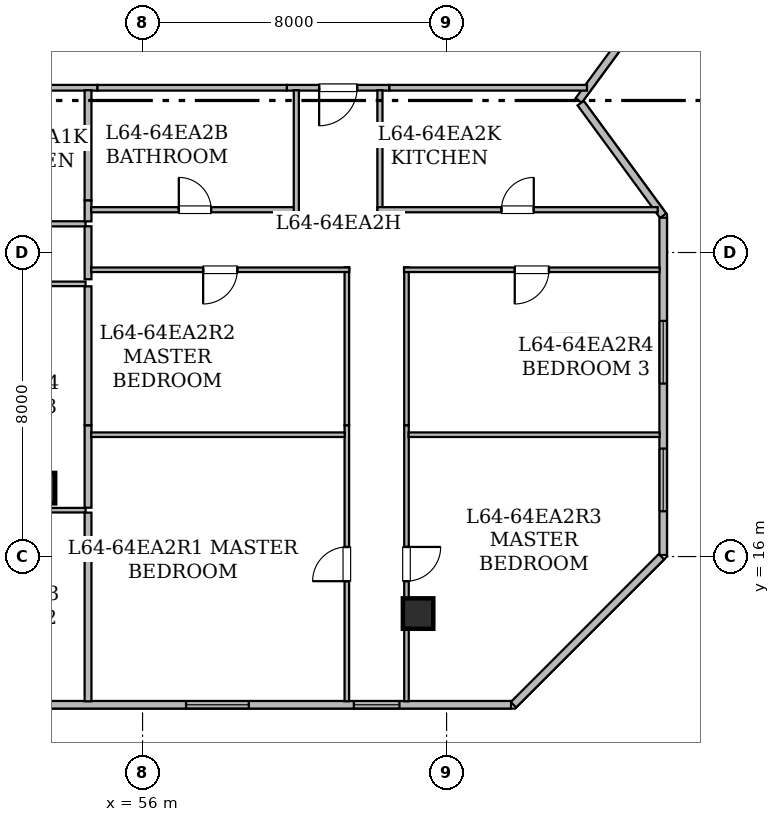
"""IFC4 building model, lengths in metres.
Left out: names, types, materials, properties, quantities, classifications, styles, units other than length and angle.
Written with IfcOpenShell. Run it as: python <this file> out.ifc"""

import sys

from ifc_helpers import new_model, si_unit, direction, frame, frame_2d, origin, origin_2d, place, context, subcontext, project, spatial, rectangle, hollow_rectangle, extrude, element, fill, save


model = new_model("IFC4")
c1 = context("Model", 3, precision=1e-05, world=origin(), true_north=direction((0.0, 1.0)))
c2 = subcontext(c1, "Body", "Model", "MODEL_VIEW")
j1 = project(units=[si_unit("LENGTHUNIT", "METRE"), si_unit("PLANEANGLEUNIT", "RADIAN")], contexts=[c1])
p1 = place(None, origin())
s1 = spatial("IfcSite", under=j1, at=p1, CompositionType="ELEMENT")
p2 = place(p1, origin())
s2 = spatial("IfcBuilding", under=s1, at=p2, CompositionType="ELEMENT")
p3 = place(p2, frame((0.0, 0.0, 250.05)))
s3 = spatial("IfcBuildingStorey", under=s2, at=p3, CompositionType="ELEMENT", Elevation=250.05)
for number, where, z_axis, x_axis in (
    (1, (63.25, 14.5, 0.0), (0.0, 0.0, 1.0), (1.0, 0.0, 0.0)),
    (2, (67.2, 21.425, 0.0), (0.0, 0.0, 1.0), (1.0, 0.0, 0.0)),
    (3, (53.3, 17.8, 0.0), (0.0, 0.0, 1.0), (1.0, 0.0, 0.0)),
):
    element("IfcColumn", number, at=place(p3, frame(where, z_axis=z_axis, x_axis=x_axis)), inside=s3, PredefinedType="COLUMN", context=c2, shape_type="SweptSolid", body=[
        extrude(hollow_rectangle(XDim=0.8, YDim=0.8, WallThickness=0.04, at=origin_2d()), origin(), (0.0, 0.0, 1.0), 3.65),
    ])
p4 = place(p3, frame((69.67, 30.992, 0.0), z_axis=(0.0, 0.0, 1.0), x_axis=(-0.591320870733, -0.806436375566, 0.0)))
e4 = element("IfcWall", 4, at=p4, inside=s3, PredefinedType="STANDARD", context=c2, shape_type="SweptSolid", body=[
    extrude(rectangle(XDim=3.71, YDim=0.2, at=frame_2d((1.855, 0.0))), origin(), (0.0, 0.0, 1.0), 3.43),
])
p5 = place(p3, frame((67.527, 27.931, 0.0), z_axis=(0.0, 0.0, 1.0), x_axis=(0.591248456881, -0.80648946815, 0.0)))
e5 = element("IfcWall", 5, at=p5, inside=s3, PredefinedType="STANDARD", context=c2, shape_type="SweptSolid", body=[
    extrude(rectangle(XDim=3.675, YDim=0.2, at=frame_2d((1.837, 0.0))), origin(), (0.0, 0.0, 1.0), 3.43),
])
p6 = place(p3, frame((69.7, 24.916, 0.0), z_axis=(0.0, 0.0, 1.0), x_axis=(0.0, -1.0, 0.0)))
e6 = element("IfcWall", 6, at=p6, inside=s3, PredefinedType="STANDARD", context=c2, shape_type="SweptSolid", body=[
    extrude(rectangle(XDim=8.875, YDim=0.2, at=frame_2d((4.438, 0.0))), origin(), (0.0, 0.0, 1.0), 3.43),
])
p7 = place(p6, frame((6.075, 0.0, 0.85)))
e7 = element("IfcOpeningElement", 7, at=p7, cuts=e6, PredefinedType="OPENING", context=c2, shape_type="SweptSolid", body=[
    extrude(rectangle(XDim=1.65, YDim=1.55, at=frame_2d((0.825, 0.775))), frame((0.0, 0.11, 0.0), z_axis=(0.0, -1.0, 0.0), x_axis=(1.0, 0.0, 0.0)), (0.0, 0.0, 1.0), 0.22),
])
p8 = place(p6, frame((2.715, 0.0, 0.85)))
e8 = element("IfcOpeningElement", 8, at=p8, cuts=e6, PredefinedType="OPENING", context=c2, shape_type="SweptSolid", body=[
    extrude(rectangle(XDim=1.65, YDim=1.55, at=frame_2d((0.825, 0.775))), frame((0.0, 0.11, 0.0), z_axis=(0.0, -1.0, 0.0), x_axis=(1.0, 0.0, 0.0)), (0.0, 0.0, 1.0), 0.22),
])
p9 = place(p3, frame((69.655, 15.996, 0.0), z_axis=(0.0, 0.0, 1.0), x_axis=(-0.707106781187, -0.707106781187, 0.0)))
e9 = element("IfcWall", 9, at=p9, inside=s3, PredefinedType="STANDARD", context=c2, shape_type="SweptSolid", body=[
    extrude(rectangle(XDim=5.51, YDim=0.2, at=frame_2d((2.755, 0.0))), origin(), (0.0, 0.0, 1.0), 3.43),
])
p10 = place(p3, frame((65.696, 12.1, 0.0), z_axis=(0.0, 0.0, 1.0), x_axis=(-1.0, 0.0, 0.0)))
e10 = element("IfcWall", 10, at=p10, inside=s3, PredefinedType="STANDARD", context=c2, shape_type="SweptSolid", body=[
    extrude(rectangle(XDim=41.393, YDim=0.2, at=frame_2d((20.697, 0.0))), origin(), (0.0, 0.0, 1.0), 3.43),
])
p11 = place(p10, frame((33.821, 0.0, 0.85)))
e11 = element("IfcOpeningElement", 11, at=p11, cuts=e10, PredefinedType="OPENING", context=c2, shape_type="SweptSolid", body=[
    extrude(rectangle(XDim=1.65, YDim=1.55, at=frame_2d((0.825, 0.775))), frame((0.0, 0.11, 0.0), z_axis=(0.0, -1.0, 0.0), x_axis=(1.0, 0.0, 0.0)), (0.0, 0.0, 1.0), 0.22),
])
p12 = place(p10, frame((39.16, 0.0, 0.85)))
e12 = element("IfcOpeningElement", 12, at=p12, cuts=e10, PredefinedType="OPENING", context=c2, shape_type="SweptSolid", body=[
    extrude(rectangle(XDim=1.65, YDim=1.55, at=frame_2d((0.825, 0.775))), frame((0.0, 0.11, 0.0), z_axis=(0.0, -1.0, 0.0), x_axis=(1.0, 0.0, 0.0)), (0.0, 0.0, 1.0), 0.22),
])
p13 = place(p10, frame((17.006, 0.0, 0.8)))
e13 = element("IfcOpeningElement", 13, at=p13, cuts=e10, PredefinedType="OPENING", context=c2, shape_type="SweptSolid", body=[
    extrude(rectangle(XDim=1.2, YDim=1.5, at=frame_2d((0.6, 0.75))), frame((0.0, 0.11, 0.0), z_axis=(0.0, -1.0, 0.0), x_axis=(1.0, 0.0, 0.0)), (0.0, 0.0, 1.0), 0.22),
])
p14 = place(p10, frame((20.411, 0.0, 0.85)))
e14 = element("IfcOpeningElement", 14, at=p14, cuts=e10, PredefinedType="OPENING", context=c2, shape_type="SweptSolid", body=[
    extrude(rectangle(XDim=1.65, YDim=1.55, at=frame_2d((0.825, 0.775))), frame((0.0, 0.11, 0.0), z_axis=(0.0, -1.0, 0.0), x_axis=(1.0, 0.0, 0.0)), (0.0, 0.0, 1.0), 0.22),
])
p15 = place(p10, frame((13.151, 0.0, 0.85)))
e15 = element("IfcOpeningElement", 15, at=p15, cuts=e10, PredefinedType="OPENING", context=c2, shape_type="SweptSolid", body=[
    extrude(rectangle(XDim=1.65, YDim=1.55, at=frame_2d((0.825, 0.775))), frame((0.0, 0.11, 0.0), z_axis=(0.0, -1.0, 0.0), x_axis=(1.0, 0.0, 0.0)), (0.0, 0.0, 1.0), 0.22),
])
p16 = place(p10, frame((2.936, 0.0, 0.8)))
e16 = element("IfcOpeningElement", 16, at=p16, cuts=e10, PredefinedType="OPENING", context=c2, shape_type="SweptSolid", body=[
    extrude(rectangle(XDim=1.2, YDim=1.5, at=frame_2d((0.6, 0.75))), frame((0.0, 0.11, 0.0), z_axis=(0.0, -1.0, 0.0), x_axis=(1.0, 0.0, 0.0)), (0.0, 0.0, 1.0), 0.22),
])
p17 = place(p10, frame((6.901, 0.0, 0.85)))
e17 = element("IfcOpeningElement", 17, at=p17, cuts=e10, PredefinedType="OPENING", context=c2, shape_type="SweptSolid", body=[
    extrude(rectangle(XDim=1.65, YDim=1.55, at=frame_2d((0.825, 0.775))), frame((0.0, 0.11, 0.0), z_axis=(0.0, -1.0, 0.0), x_axis=(1.0, 0.0, 0.0)), (0.0, 0.0, 1.0), 0.22),
])
p18 = place(p3, frame((54.814, 28.335, 0.0), z_axis=(0.0, 0.0, 1.0), x_axis=(-1.0, 0.0, 0.0)))
e18 = element("IfcWall", 18, at=p18, inside=s3, PredefinedType="STANDARD", context=c2, shape_type="SweptSolid", body=[
    extrude(rectangle(XDim=5.375, YDim=0.15, at=frame_2d((2.688, 0.0))), origin(), (0.0, 0.0, 1.0), 2.725),
])
p19 = place(p3, frame((62.495, 28.335, 0.0), z_axis=(0.0, 0.0, 1.0), x_axis=(-1.0, 0.0, 0.0)))
e19 = element("IfcWall", 19, at=p19, inside=s3, PredefinedType="STANDARD", context=c2, shape_type="SweptSolid", body=[
    extrude(rectangle(XDim=2.699, YDim=0.15, at=frame_2d((1.35, 0.0))), origin(), (0.0, 0.0, 1.0), 3.43),
])
p20 = place(p19, frame((0.849, 0.0, 0.0)))
e20 = element("IfcOpeningElement", 20, at=p20, cuts=e19, PredefinedType="OPENING", context=c2, shape_type="SweptSolid", body=[
    extrude(rectangle(XDim=1.0, YDim=2.15, at=frame_2d((0.5, 1.075))), frame((0.0, 0.085, 0.0), z_axis=(0.0, -1.0, 0.0), x_axis=(1.0, 0.0, 0.0)), (0.0, 0.0, 1.0), 0.17),
])
p21 = place(p3, frame((59.796, 28.335, 0.0), z_axis=(0.0, 0.0, 1.0), x_axis=(-1.0, 0.0, 0.0)))
e21 = element("IfcWall", 21, at=p21, inside=s3, PredefinedType="STANDARD", context=c2, shape_type="SweptSolid", body=[
    extrude(rectangle(XDim=4.982, YDim=0.15, at=frame_2d((2.491, 0.0))), origin(), (0.0, 0.0, 1.0), 3.43),
])
p22 = place(p3, frame((67.694, 28.335, 0.0), z_axis=(0.0, 0.0, 1.0), x_axis=(-1.0, 0.0, 0.0)))
e22 = element("IfcWall", 22, at=p22, inside=s3, PredefinedType="STANDARD", context=c2, shape_type="SweptSolid", body=[
    extrude(rectangle(XDim=5.199, YDim=0.15, at=frame_2d((2.6, 0.0))), origin(), (0.0, 0.0, 1.0), 2.887),
])
p23 = place(p3, frame((49.125, 24.755, 0.0), z_axis=(0.0, 0.0, 1.0), x_axis=(1.0, 0.0, 0.0)))
e23 = element("IfcWall", 23, at=p23, inside=s3, PredefinedType="PARTITIONING", context=c2, shape_type="SweptSolid", body=[
    extrude(rectangle(XDim=5.375, YDim=0.135, at=frame_2d((2.688, 0.0))), origin(), (0.0, 0.0, 1.0), 2.725),
])
p24 = place(p23, frame((2.263, 0.0, 0.0)))
e24 = element("IfcOpeningElement", 24, at=p24, cuts=e23, PredefinedType="OPENING", context=c2, shape_type="SweptSolid", body=[
    extrude(rectangle(XDim=0.85, YDim=2.1, at=frame_2d((0.425, 1.05))), frame((0.0, 0.077, 0.0), z_axis=(0.0, -1.0, 0.0), x_axis=(1.0, 0.0, 0.0)), (0.0, 0.0, 1.0), 0.155),
])
p25 = place(p3, frame((54.5, 23.175, 0.0), z_axis=(0.0, 0.0, 1.0), x_axis=(-1.0, 0.0, 0.0)))
e25 = element("IfcWall", 25, at=p25, inside=s3, PredefinedType="PARTITIONING", context=c2, shape_type="SweptSolid", body=[
    extrude(rectangle(XDim=5.69, YDim=0.12, at=frame_2d((2.845, 0.0))), origin(), (0.0, 0.0, 1.0), 2.725),
])
p26 = place(p3, frame((54.565, 24.69, 0.0), z_axis=(0.0, 0.0, 1.0), x_axis=(0.0, -1.0, 0.0)))
e26 = element("IfcWall", 26, at=p26, inside=s3, PredefinedType="STANDARD", context=c2, shape_type="SweptSolid", body=[
    extrude(rectangle(XDim=1.393, YDim=0.18, at=frame_2d((0.696, 0.0))), origin(), (0.0, 0.0, 1.0), 3.43),
])
p27 = place(p3, frame((54.565, 25.375, 0.0), z_axis=(0.0, 0.0, 1.0), x_axis=(0.0, -1.0, 0.0)))
e27 = element("IfcWall", 27, at=p27, inside=s3, PredefinedType="STANDARD", context=c2, shape_type="SweptSolid", body=[
    extrude(rectangle(XDim=0.555, YDim=0.18, at=frame_2d((0.277, 0.0))), origin(), (0.0, 0.0, 1.0), 3.43),
])
p28 = place(p3, frame((54.565, 28.27, 0.0), z_axis=(0.0, 0.0, 1.0), x_axis=(0.0, -1.0, 0.0)))
e28 = element("IfcWall", 28, at=p28, inside=s3, PredefinedType="STANDARD", context=c2, shape_type="SweptSolid", body=[
    extrude(rectangle(XDim=2.895, YDim=0.18, at=frame_2d((1.448, 0.0))), origin(), (0.0, 0.0, 1.0), 3.43),
])
p29 = place(p3, frame((48.929, 17.22, 0.0), z_axis=(0.0, 0.0, 1.0), x_axis=(1.0, 0.0, 0.0)))
e29 = element("IfcWall", 29, at=p29, inside=s3, PredefinedType="PARTITIONING", context=c2, shape_type="SweptSolid", body=[
    extrude(rectangle(XDim=5.571, YDim=0.12, at=frame_2d((2.786, 0.0))), origin(), (0.0, 0.0, 1.0), 2.725),
])
p30 = place(p3, frame((54.565, 17.155, 0.0), z_axis=(0.0, 0.0, 1.0), x_axis=(0.0, -1.0, 0.0)))
e30 = element("IfcWall", 30, at=p30, inside=s3, PredefinedType="STANDARD", context=c2, shape_type="SweptSolid", body=[
    extrude(rectangle(XDim=4.963, YDim=0.18, at=frame_2d((2.481, 0.0))), origin(), (0.0, 0.0, 1.0), 2.725),
])
p31 = place(p3, frame((54.565, 19.455, 0.0), z_axis=(0.0, 0.0, 1.0), x_axis=(0.0, -1.0, 0.0)))
e31 = element("IfcWall", 31, at=p31, inside=s3, PredefinedType="STANDARD", context=c2, shape_type="SweptSolid", body=[
    extrude(rectangle(XDim=2.17, YDim=0.18, at=frame_2d((1.085, 0.0))), origin(), (0.0, 0.0, 1.0), 2.725),
])
p32 = place(p3, frame((54.565, 23.11, 0.0), z_axis=(0.0, 0.0, 1.0), x_axis=(0.0, -1.0, 0.0)))
e32 = element("IfcWall", 32, at=p32, inside=s3, PredefinedType="STANDARD", context=c2, shape_type="SweptSolid", body=[
    extrude(rectangle(XDim=3.655, YDim=0.18, at=frame_2d((1.828, 0.0))), origin(), (0.0, 0.0, 1.0), 3.43),
])
p33 = place(p3, frame((54.647, 25.126, 0.0), z_axis=(0.0, 0.0, 1.0), x_axis=(1.0, 0.0, 0.0)))
e33 = element("IfcWall", 33, at=p33, inside=s3, PredefinedType="PARTITIONING", context=c2, shape_type="SweptSolid", body=[
    extrude(rectangle(XDim=5.464, YDim=0.135, at=frame_2d((2.732, 0.0))), origin(), (0.0, 0.0, 1.0), 3.43),
])
p34 = place(p33, frame((2.307, 0.0, 0.0)))
e34 = element("IfcOpeningElement", 34, at=p34, cuts=e33, PredefinedType="OPENING", context=c2, shape_type="SweptSolid", body=[
    extrude(rectangle(XDim=0.85, YDim=2.1, at=frame_2d((0.425, 1.05))), frame((0.0, 0.077, 0.0), z_axis=(0.0, -1.0, 0.0), x_axis=(1.0, 0.0, 0.0)), (0.0, 0.0, 1.0), 0.155),
])
for number, where, z_axis, x_axis in (
    (35, (60.046, 25.061, 0.0), (0.0, 0.0, 1.0), (0.0, 1.0, 0.0)),
    (36, (62.246, 28.27, 0.0), (0.0, 0.0, 1.0), (0.0, -1.0, 0.0)),
):
    element("IfcWall", number, at=place(p3, frame(where, z_axis=z_axis, x_axis=x_axis)), inside=s3, PredefinedType="PARTITIONING", context=c2, shape_type="SweptSolid", body=[
        extrude(rectangle(XDim=3.209, YDim=0.135, at=frame_2d((1.604, 0.0))), origin(), (0.0, 0.0, 1.0), 3.43),
    ])
p35 = place(p3, frame((62.181, 25.126, 0.0), z_axis=(0.0, 0.0, 1.0), x_axis=(1.0, 0.0, 0.0)))
e37 = element("IfcWall", 37, at=p35, inside=s3, PredefinedType="PARTITIONING", context=c2, shape_type="SweptSolid", body=[
    extrude(rectangle(XDim=7.375, YDim=0.135, at=frame_2d((3.688, 0.0))), origin(), (0.0, 0.0, 1.0), 2.887),
])
p36 = place(p35, frame((3.263, 0.0, 0.0)))
e38 = element("IfcOpeningElement", 38, at=p36, cuts=e37, PredefinedType="OPENING", context=c2, shape_type="SweptSolid", body=[
    extrude(rectangle(XDim=0.85, YDim=2.1, at=frame_2d((0.425, 1.05))), frame((0.0, 0.077, 0.0), z_axis=(0.0, -1.0, 0.0), x_axis=(1.0, 0.0, 0.0)), (0.0, 0.0, 1.0), 0.155),
])
p37 = place(p3, frame((61.375, 12.192, 0.0), z_axis=(0.0, 0.0, 1.0), x_axis=(0.0, 1.0, 0.0)))
e39 = element("IfcWall", 39, at=p37, inside=s3, PredefinedType="PARTITIONING", context=c2, shape_type="SweptSolid", body=[
    extrude(rectangle(XDim=7.263, YDim=0.12, at=frame_2d((3.632, 0.0))), origin(), (0.0, 0.0, 1.0), 2.725),
])
p38 = place(p37, frame((3.16, 0.0, 0.0)))
e40 = element("IfcOpeningElement", 40, at=p38, cuts=e39, PredefinedType="OPENING", context=c2, shape_type="SweptSolid", body=[
    extrude(rectangle(XDim=0.9, YDim=2.1, at=frame_2d((0.45, 1.05))), frame((0.0, 0.07, 0.0), z_axis=(0.0, -1.0, 0.0), x_axis=(1.0, 0.0, 0.0)), (0.0, 0.0, 1.0), 0.14),
])
p39 = place(p3, frame((61.375, 19.455, 0.0), z_axis=(0.0, 0.0, 1.0), x_axis=(0.0, 1.0, 0.0)))
e41 = element("IfcWall", 41, at=p39, inside=s3, PredefinedType="PARTITIONING", context=c2, shape_type="SweptSolid", body=[
    extrude(rectangle(XDim=4.156, YDim=0.12, at=frame_2d((2.078, 0.0))), origin(), (0.0, 0.0, 1.0), 2.725),
])
p40 = place(p3, frame((61.44, 23.546, 0.0), z_axis=(0.0, 0.0, 1.0), x_axis=(-1.0, 0.0, 0.0)))
e42 = element("IfcWall", 42, at=p40, inside=s3, PredefinedType="PARTITIONING", context=c2, shape_type="SweptSolid", body=[
    extrude(rectangle(XDim=6.793, YDim=0.12, at=frame_2d((3.396, 0.0))), origin(), (0.0, 0.0, 1.0), 3.43),
])
p41 = place(p40, frame((2.946, 0.0, 0.0)))
e43 = element("IfcOpeningElement", 43, at=p41, cuts=e42, PredefinedType="OPENING", context=c2, shape_type="SweptSolid", body=[
    extrude(rectangle(XDim=0.9, YDim=2.1, at=frame_2d((0.45, 1.05))), frame((0.0, 0.07, 0.0), z_axis=(0.0, -1.0, 0.0), x_axis=(1.0, 0.0, 0.0)), (0.0, 0.0, 1.0), 0.14),
])
p42 = place(p3, frame((62.945, 19.455, 0.0), z_axis=(0.0, 0.0, 1.0), x_axis=(0.0, -1.0, 0.0)))
e44 = element("IfcWall", 44, at=p42, inside=s3, PredefinedType="PARTITIONING", context=c2, shape_type="SweptSolid", body=[
    extrude(rectangle(XDim=7.263, YDim=0.12, at=frame_2d((3.632, 0.0))), origin(), (0.0, 0.0, 1.0), 2.725),
])
p43 = place(p42, frame((3.202, 0.0, 0.0)))
e45 = element("IfcOpeningElement", 45, at=p43, cuts=e44, PredefinedType="OPENING", context=c2, shape_type="SweptSolid", body=[
    extrude(rectangle(XDim=0.9, YDim=2.1, at=frame_2d((0.45, 1.05))), frame((0.0, 0.07, 0.0), z_axis=(0.0, -1.0, 0.0), x_axis=(1.0, 0.0, 0.0)), (0.0, 0.0, 1.0), 0.14),
])
p44 = place(p3, frame((62.945, 23.611, 0.0), z_axis=(0.0, 0.0, 1.0), x_axis=(0.0, -1.0, 0.0)))
e46 = element("IfcWall", 46, at=p44, inside=s3, PredefinedType="PARTITIONING", context=c2, shape_type="SweptSolid", body=[
    extrude(rectangle(XDim=4.156, YDim=0.12, at=frame_2d((2.078, 0.0))), origin(), (0.0, 0.0, 1.0), 2.725),
])
p45 = place(p3, frame((69.608, 23.546, 0.0), z_axis=(0.0, 0.0, 1.0), x_axis=(-1.0, 0.0, 0.0)))
e47 = element("IfcWall", 47, at=p45, inside=s3, PredefinedType="PARTITIONING", context=c2, shape_type="SweptSolid", body=[
    extrude(rectangle(XDim=6.728, YDim=0.12, at=frame_2d((3.364, 0.0))), origin(), (0.0, 0.0, 1.0), 2.887),
])
p46 = place(p45, frame((2.914, 0.0, 0.0)))
e48 = element("IfcOpeningElement", 48, at=p46, cuts=e47, PredefinedType="OPENING", context=c2, shape_type="SweptSolid", body=[
    extrude(rectangle(XDim=0.9, YDim=2.1, at=frame_2d((0.45, 1.05))), frame((0.0, 0.07, 0.0), z_axis=(0.0, -1.0, 0.0), x_axis=(1.0, 0.0, 0.0)), (0.0, 0.0, 1.0), 0.14),
])
p47 = place(p3, frame((54.647, 19.206, 0.0), z_axis=(0.0, 0.0, 1.0), x_axis=(1.0, 0.0, 0.0)))
e49 = element("IfcWall", 49, at=p47, inside=s3, PredefinedType="PARTITIONING", context=c2, shape_type="SweptSolid", body=[
    extrude(rectangle(XDim=6.674, YDim=0.12, at=frame_2d((3.337, 0.0))), origin(), (0.0, 0.0, 1.0), 2.725),
])
p48 = place(p3, frame((62.999, 19.206, 0.0), z_axis=(0.0, 0.0, 1.0), x_axis=(1.0, 0.0, 0.0)))
e50 = element("IfcWall", 50, at=p48, inside=s3, PredefinedType="PARTITIONING", context=c2, shape_type="SweptSolid", body=[
    extrude(rectangle(XDim=6.609, YDim=0.12, at=frame_2d((3.304, 0.0))), origin(), (0.0, 0.0, 1.0), 2.887),
])
p49 = place(p16, origin())
e51 = element("IfcWindow", 51, at=p49, inside=s3, PartitioningType="SINGLE_PANEL", PredefinedType="WINDOW", context=c2, shape_type="SweptSolid", body=[
    extrude(rectangle(XDim=1.2, YDim=1.5, at=frame_2d((0.6, 0.75))), frame((0.0, 0.03, 0.0), z_axis=(0.0, -1.0, 0.0), x_axis=(1.0, 0.0, 0.0)), (0.0, 0.0, 1.0), 0.06),
])
fill(e16, e51)
p50 = place(p17, origin())
e52 = element("IfcWindow", 52, at=p50, inside=s3, PartitioningType="SINGLE_PANEL", PredefinedType="WINDOW", context=c2, shape_type="SweptSolid", body=[
    extrude(rectangle(XDim=1.65, YDim=1.55, at=frame_2d((0.825, 0.775))), frame((0.0, 0.03, 0.0), z_axis=(0.0, -1.0, 0.0), x_axis=(1.0, 0.0, 0.0)), (0.0, 0.0, 1.0), 0.06),
])
fill(e17, e52)
p51 = place(p7, origin())
e53 = element("IfcWindow", 53, at=p51, inside=s3, PartitioningType="SINGLE_PANEL", PredefinedType="WINDOW", context=c2, shape_type="SweptSolid", body=[
    extrude(rectangle(XDim=1.65, YDim=1.55, at=frame_2d((0.825, 0.775))), frame((0.0, 0.03, 0.0), z_axis=(0.0, -1.0, 0.0), x_axis=(1.0, 0.0, 0.0)), (0.0, 0.0, 1.0), 0.06),
])
fill(e7, e53)
p52 = place(p8, origin())
e54 = element("IfcWindow", 54, at=p52, inside=s3, PartitioningType="SINGLE_PANEL", PredefinedType="WINDOW", context=c2, shape_type="SweptSolid", body=[
    extrude(rectangle(XDim=1.65, YDim=1.55, at=frame_2d((0.825, 0.775))), frame((0.0, 0.03, 0.0), z_axis=(0.0, -1.0, 0.0), x_axis=(1.0, 0.0, 0.0)), (0.0, 0.0, 1.0), 0.06),
])
fill(e8, e54)
p53 = place(p20, origin())
e55 = element("IfcDoor", 55, at=p53, inside=s3, OperationType="SINGLE_SWING_RIGHT", PredefinedType="DOOR", context=c2, shape_type="SweptSolid", body=[
    extrude(rectangle(XDim=1.0, YDim=2.15, at=frame_2d((0.5, 1.075))), frame((0.0, 0.025, 0.0), z_axis=(0.0, -1.0, 0.0), x_axis=(1.0, 0.0, 0.0)), (0.0, 0.0, 1.0), 0.05),
])
fill(e20, e55)
p54 = place(p34, origin())
e56 = element("IfcDoor", 56, at=p54, inside=s3, OperationType="SINGLE_SWING_LEFT", PredefinedType="DOOR", context=c2, shape_type="SweptSolid", body=[
    extrude(rectangle(XDim=0.85, YDim=2.1, at=frame_2d((0.425, 1.05))), frame((0.0, 0.025, 0.0), z_axis=(0.0, -1.0, 0.0), x_axis=(1.0, 0.0, 0.0)), (0.0, 0.0, 1.0), 0.05),
])
fill(e34, e56)
p55 = place(p36, origin())
e57 = element("IfcDoor", 57, at=p55, inside=s3, OperationType="SINGLE_SWING_RIGHT", PredefinedType="DOOR", context=c2, shape_type="SweptSolid", body=[
    extrude(rectangle(XDim=0.85, YDim=2.1, at=frame_2d((0.425, 1.05))), frame((0.0, 0.025, 0.0), z_axis=(0.0, -1.0, 0.0), x_axis=(1.0, 0.0, 0.0)), (0.0, 0.0, 1.0), 0.05),
])
fill(e38, e57)
p56 = place(p38, origin())
e58 = element("IfcDoor", 58, at=p56, inside=s3, OperationType="SINGLE_SWING_LEFT", PredefinedType="DOOR", context=c2, shape_type="SweptSolid", body=[
    extrude(rectangle(XDim=0.9, YDim=2.1, at=frame_2d((0.45, 1.05))), frame((0.0, 0.025, 0.0), z_axis=(0.0, -1.0, 0.0), x_axis=(1.0, 0.0, 0.0)), (0.0, 0.0, 1.0), 0.05),
])
fill(e40, e58)
p57 = place(p41, origin())
e59 = element("IfcDoor", 59, at=p57, inside=s3, OperationType="SINGLE_SWING_RIGHT", PredefinedType="DOOR", context=c2, shape_type="SweptSolid", body=[
    extrude(rectangle(XDim=0.9, YDim=2.1, at=frame_2d((0.45, 1.05))), frame((0.0, 0.025, 0.0), z_axis=(0.0, -1.0, 0.0), x_axis=(1.0, 0.0, 0.0)), (0.0, 0.0, 1.0), 0.05),
])
fill(e43, e59)
p58 = place(p43, origin())
e60 = element("IfcDoor", 60, at=p58, inside=s3, OperationType="SINGLE_SWING_LEFT", PredefinedType="DOOR", context=c2, shape_type="SweptSolid", body=[
    extrude(rectangle(XDim=0.9, YDim=2.1, at=frame_2d((0.45, 1.05))), frame((0.0, 0.025, 0.0), z_axis=(0.0, -1.0, 0.0), x_axis=(1.0, 0.0, 0.0)), (0.0, 0.0, 1.0), 0.05),
])
fill(e45, e60)
p59 = place(p46, origin())
e61 = element("IfcDoor", 61, at=p59, inside=s3, OperationType="SINGLE_SWING_RIGHT", PredefinedType="DOOR", context=c2, shape_type="SweptSolid", body=[
    extrude(rectangle(XDim=0.9, YDim=2.1, at=frame_2d((0.45, 1.05))), frame((0.0, 0.025, 0.0), z_axis=(0.0, -1.0, 0.0), x_axis=(1.0, 0.0, 0.0)), (0.0, 0.0, 1.0), 0.05),
])
fill(e48, e61)
save(model, sys.argv[1])
